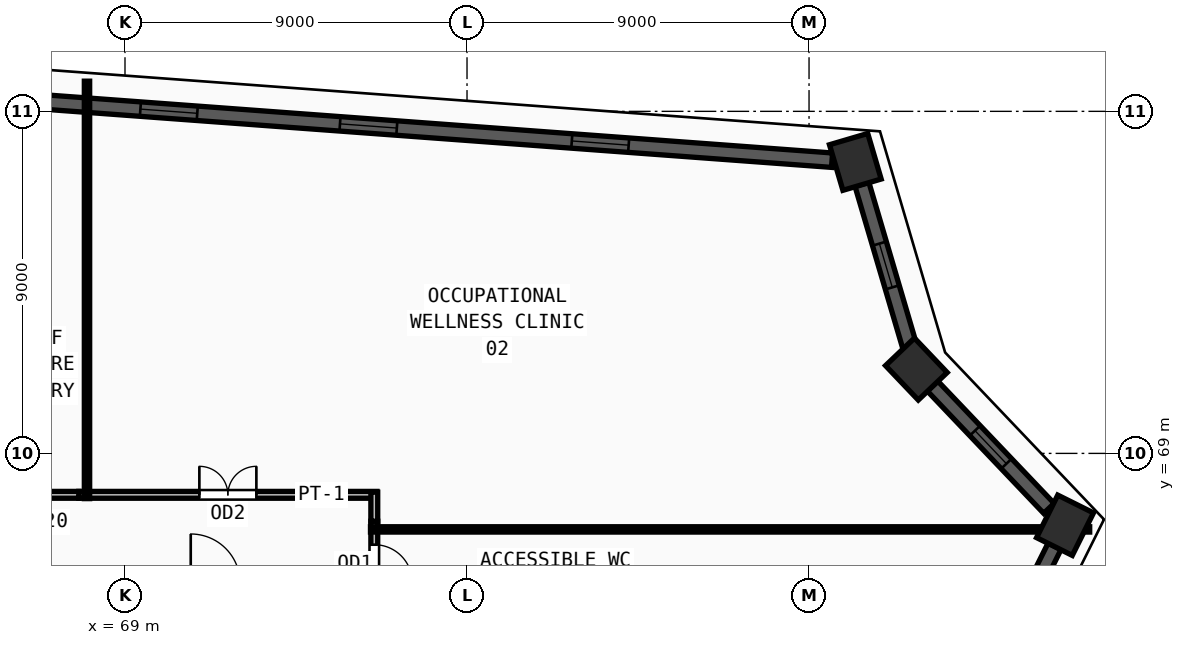
"""IFC4 building model, lengths in metres.
Left out: names, types, materials, properties, quantities, classifications, styles, units other than length and angle.
Written with IfcOpenShell. Run it as: python <this file> out.ifc"""

import sys

from ifc_helpers import new_model, si_unit, direction, frame, frame_2d, origin, origin_2d, place, context, subcontext, project, spatial, rectangle, extrude, source, transform, mapped, element, fill, save


model = new_model("IFC4")
c1 = context("Model", 3, precision=1e-05, world=origin(), true_north=direction((0.0, 1.0)))
c2 = subcontext(c1, "Body", "Model", "MODEL_VIEW")
j1 = project(units=[si_unit("LENGTHUNIT", "METRE"), si_unit("PLANEANGLEUNIT", "RADIAN")], contexts=[c1])
p1 = place(None, origin())
s1 = spatial("IfcSite", under=j1, at=p1, CompositionType="ELEMENT")
p2 = place(p1, origin())
s2 = spatial("IfcBuilding", under=s1, at=p2, CompositionType="ELEMENT")
p3 = place(p2, frame((0.0, 0.0, 201.75)))
s3 = spatial("IfcBuildingStorey", under=s2, at=p3, CompositionType="ELEMENT", Elevation=201.75)
m1 = source(origin(), c2, "Body", "SweptSolid", [
    extrude(rectangle(XDim=1.25, YDim=1.05, at=origin_2d()), origin(), (0.0, 0.0, 1.0), 3.75),
])
for number, where, z_axis, x_axis in (
    (1, (88.218, 76.67, 0.0), (0.0, 0.0, 1.0), (-0.283, 0.959, 0.0)),
    (2, (89.824, 71.219, 0.0), (0.0, 0.0, 1.0), (-0.689, 0.724, 0.0)),
    (3, (93.736, 67.109, 0.0), (0.0, 0.0, 1.0), (0.446, 0.895, 0.0)),
):
    element("IfcColumn", number, at=place(p3, frame(where, z_axis=z_axis, x_axis=x_axis)), inside=s3, PredefinedType="COLUMN", context=c2, shape_type="MappedRepresentation", body=[
        mapped(m1, transform((0.0, 0.0, 0.0), x_axis=(1.0, 0.0, 0.0), y_axis=(0.0, 1.0, 0.0), z_axis=(0.0, 0.0, 1.0), scale=1.0)),
    ])
p4 = place(p3, frame((80.249, 40.024, 0.0), z_axis=(0.0, 0.0, 1.0), x_axis=(0.445750225077, 0.895157381047, 0.0)))
e4 = element("IfcWall", 4, at=p4, inside=s3, PredefinedType="SOLIDWALL", context=c2, shape_type="SweptSolid", body=[
    extrude(rectangle(XDim=29.642, YDim=0.38, at=frame_2d((14.821, 0.0))), origin(), (0.0, 0.0, 1.0), 3.57),
])
m2 = source(origin(), c2, "Body", "SweptSolid", [
    extrude(rectangle(XDim=1.5, YDim=1.9, at=frame_2d((0.75, 0.95))), frame((0.0, 0.2, 0.0), z_axis=(0.0, -1.0, 0.0), x_axis=(1.0, 0.0, 0.0)), (0.0, 0.0, 1.0), 0.4),
])
p5 = place(p4, frame((7.51, 0.0, 0.55)))
e5 = element("IfcOpeningElement", 5, at=p5, cuts=e4, PredefinedType="OPENING", context=c2, shape_type="MappedRepresentation", body=[
    mapped(m2, transform((0.0, 0.0, 0.0), x_axis=(1.0, 0.0, 0.0), y_axis=(0.0, 1.0, 0.0), z_axis=(0.0, 0.0, 1.0), scale=1.0)),
])
p6 = place(p4, frame((14.071, 0.0, 0.55)))
e6 = element("IfcOpeningElement", 6, at=p6, cuts=e4, PredefinedType="OPENING", context=c2, shape_type="MappedRepresentation", body=[
    mapped(m2, transform((0.0, 0.0, 0.0), x_axis=(1.0, 0.0, 0.0), y_axis=(0.0, 1.0, 0.0), z_axis=(0.0, 0.0, 1.0), scale=1.0)),
])
p7 = place(p4, frame((21.481, 0.0, 0.55)))
e7 = element("IfcOpeningElement", 7, at=p7, cuts=e4, PredefinedType="OPENING", context=c2, shape_type="MappedRepresentation", body=[
    mapped(m2, transform((0.0, 0.0, 0.0), x_axis=(1.0, 0.0, 0.0), y_axis=(0.0, 1.0, 0.0), z_axis=(0.0, 0.0, 1.0), scale=1.0)),
])
p8 = place(p3, frame((93.312, 67.554, 0.0), z_axis=(0.0, 0.0, 1.0), x_axis=(-0.689339649611, 0.724438297906, 0.0)))
e8 = element("IfcWall", 8, at=p8, inside=s3, PredefinedType="SOLIDWALL", context=c2, shape_type="SweptSolid", body=[
    extrude(rectangle(XDim=4.445, YDim=0.38, at=frame_2d((2.222, 0.0))), origin(), (0.0, 0.0, 1.0), 3.57),
])
m3 = source(origin(), c2, "Body", "SweptSolid", [
    extrude(rectangle(XDim=1.2, YDim=1.9, at=frame_2d((0.6, 0.95))), frame((0.0, 0.2, 0.0), z_axis=(0.0, -1.0, 0.0), x_axis=(1.0, 0.0, 0.0)), (0.0, 0.0, 1.0), 0.4),
])
p9 = place(p8, frame((1.622, 0.0, 0.55)))
e9 = element("IfcOpeningElement", 9, at=p9, cuts=e8, PredefinedType="OPENING", context=c2, shape_type="MappedRepresentation", body=[
    mapped(m3, transform((0.0, 0.0, 0.0), x_axis=(1.0, 0.0, 0.0), y_axis=(0.0, 1.0, 0.0), z_axis=(0.0, 0.0, 1.0), scale=1.0)),
])
p10 = place(p3, frame((89.65, 71.809, 0.0), z_axis=(0.0, 0.0, 1.0), x_axis=(-0.282504740452, 0.95926590246, 0.0)))
e10 = element("IfcWall", 10, at=p10, inside=s3, PredefinedType="SOLIDWALL", context=c2, shape_type="SweptSolid", body=[
    extrude(rectangle(XDim=4.452, YDim=0.38, at=frame_2d((2.226, 0.0))), origin(), (0.0, 0.0, 1.0), 3.57),
])
p11 = place(p10, frame((1.626, 0.0, 0.55)))
e11 = element("IfcOpeningElement", 11, at=p11, cuts=e10, PredefinedType="OPENING", context=c2, shape_type="MappedRepresentation", body=[
    mapped(m3, transform((0.0, 0.0, 0.0), x_axis=(1.0, 0.0, 0.0), y_axis=(0.0, 1.0, 0.0), z_axis=(0.0, 0.0, 1.0), scale=1.0)),
])
p12 = place(p3, frame((87.605, 76.715, 0.0), z_axis=(0.0, 0.0, 1.0), x_axis=(-0.997283768188, 0.073655181142, 0.0)))
e12 = element("IfcWall", 12, at=p12, inside=s3, PredefinedType="SOLIDWALL", context=c2, shape_type="SweptSolid", body=[
    extrude(rectangle(XDim=24.465, YDim=0.38, at=frame_2d((12.233, 0.0))), origin(), (0.0, 0.0, 1.0), 3.57),
])
p13 = place(p12, frame((5.366, 0.0, 0.55)))
e13 = element("IfcOpeningElement", 13, at=p13, cuts=e12, PredefinedType="OPENING", context=c2, shape_type="MappedRepresentation", body=[
    mapped(m2, transform((0.0, 0.0, 0.0), x_axis=(1.0, 0.0, 0.0), y_axis=(0.0, 1.0, 0.0), z_axis=(0.0, 0.0, 1.0), scale=1.0)),
])
p14 = place(p12, frame((11.483, 0.0, 0.55)))
e14 = element("IfcOpeningElement", 14, at=p14, cuts=e12, PredefinedType="OPENING", context=c2, shape_type="MappedRepresentation", body=[
    mapped(m2, transform((0.0, 0.0, 0.0), x_axis=(1.0, 0.0, 0.0), y_axis=(0.0, 1.0, 0.0), z_axis=(0.0, 0.0, 1.0), scale=1.0)),
])
p15 = place(p12, frame((16.749, 0.0, 0.55)))
e15 = element("IfcOpeningElement", 15, at=p15, cuts=e12, PredefinedType="OPENING", context=c2, shape_type="MappedRepresentation", body=[
    mapped(m2, transform((0.0, 0.0, 0.0), x_axis=(1.0, 0.0, 0.0), y_axis=(0.0, 1.0, 0.0), z_axis=(0.0, 0.0, 1.0), scale=1.0)),
])
p16 = place(p3, frame((75.56, 67.215, 0.0), z_axis=(0.0, 0.0, 1.0), x_axis=(0.0, -1.0, 0.0)))
e16 = element("IfcWall", 16, at=p16, inside=s3, PredefinedType="PARTITIONING", context=c2, shape_type="SweptSolid", body=[
    extrude(rectangle(XDim=2.235, YDim=0.18, at=frame_2d((1.118, 0.0))), origin(), (0.0, 0.0, 1.0), 3.57),
])
m4 = source(origin(), c2, "Body", "SweptSolid", [
    extrude(rectangle(XDim=1.0, YDim=2.2, at=frame_2d((0.5, 1.1))), frame((0.0, 0.1, 0.0), z_axis=(0.0, -1.0, 0.0), x_axis=(1.0, 0.0, 0.0)), (0.0, 0.0, 1.0), 0.2),
])
p17 = place(p16, frame((0.617, 0.0, 0.0)))
e17 = element("IfcOpeningElement", 17, at=p17, cuts=e16, PredefinedType="OPENING", context=c2, shape_type="MappedRepresentation", body=[
    mapped(m4, transform((0.0, 0.0, 0.0), x_axis=(1.0, 0.0, 0.0), y_axis=(0.0, 1.0, 0.0), z_axis=(0.0, 0.0, 1.0), scale=1.0)),
])
p18 = place(p3, frame((67.785, 67.91, 0.0), z_axis=(0.0, 0.0, 1.0), x_axis=(1.0, 0.0, 0.0)))
e18 = element("IfcWall", 18, at=p18, inside=s3, PredefinedType="PARTITIONING", context=c2, shape_type="SweptSolid", body=[
    extrude(rectangle(XDim=7.845, YDim=0.18, at=frame_2d((3.922, 0.0))), origin(), (0.0, 0.0, 1.0), 3.57),
])
m5 = source(origin(), c2, "Body", "SweptSolid", [
    extrude(rectangle(XDim=1.5, YDim=2.2, at=frame_2d((0.75, 1.1))), frame((0.0, 0.1, 0.0), z_axis=(0.0, -1.0, 0.0), x_axis=(1.0, 0.0, 0.0)), (0.0, 0.0, 1.0), 0.2),
])
p19 = place(p18, frame((3.172, 0.0, 0.0)))
e19 = element("IfcOpeningElement", 19, at=p19, cuts=e18, PredefinedType="OPENING", context=c2, shape_type="MappedRepresentation", body=[
    mapped(m5, transform((0.0, 0.0, 0.0), x_axis=(1.0, 0.0, 0.0), y_axis=(0.0, 1.0, 0.0), z_axis=(0.0, 0.0, 1.0), scale=1.0)),
])
p20 = place(p3, frame((75.56, 67.98, 0.0), z_axis=(0.0, 0.0, 1.0), x_axis=(0.0, -1.0, 0.0)))
e20 = element("IfcWall", 20, at=p20, inside=s3, PredefinedType="PARTITIONING", context=c2, shape_type="SweptSolid", body=[
    extrude(rectangle(XDim=0.765, YDim=0.18, at=frame_2d((0.382, 0.0))), origin(), (0.0, 0.0, 1.0), 3.57),
])
p21 = place(p3, frame((65.39, 67.91, 0.0), z_axis=(0.0, 0.0, 1.0), x_axis=(1.0, 0.0, 0.0)))
e21 = element("IfcWall", 21, at=p21, inside=s3, PredefinedType="PARTITIONING", context=c2, shape_type="SweptSolid", body=[
    extrude(rectangle(XDim=2.395, YDim=0.18, at=frame_2d((1.198, 0.0))), origin(), (0.0, 0.0, 1.0), 3.57),
])
p22 = place(p3, frame((75.46, 67.0, 0.0), z_axis=(0.0, 0.0, 1.0), x_axis=(1.0, 0.0, 0.0)))
e22 = element("IfcWall", 22, at=p22, inside=s3, PredefinedType="PARTITIONING", context=c2, shape_type="SweptSolid", body=[
    extrude(rectangle(XDim=18.925, YDim=0.14, at=frame_2d((9.462, 0.0))), origin(), (0.0, 0.0, 1.0), 2.855),
])
p23 = place(p3, frame((68.0, 67.81, 0.0), z_axis=(0.0, 0.0, 1.0), x_axis=(0.0, 1.0, 0.0)))
e23 = element("IfcWall", 23, at=p23, inside=s3, PredefinedType="PARTITIONING", context=c2, shape_type="SweptSolid", body=[
    extrude(rectangle(XDim=10.984, YDim=0.14, at=frame_2d((5.492, 0.0))), origin(), (0.0, 0.0, 1.0), 3.57),
])
m6 = source(origin(), c2, "Body", "SweptSolid", [
    extrude(rectangle(XDim=1.2, YDim=1.9, at=frame_2d((0.6, 0.95))), frame((0.0, 0.03, 0.0), z_axis=(0.0, -1.0, 0.0), x_axis=(1.0, 0.0, 0.0)), (0.0, 0.0, 1.0), 0.06),
])
p24 = place(p9, origin())
e24 = element("IfcWindow", 24, at=p24, inside=s3, PartitioningType="SINGLE_PANEL", PredefinedType="WINDOW", context=c2, shape_type="MappedRepresentation", body=[
    mapped(m6, transform((0.0, 0.0, 0.0), x_axis=(1.0, 0.0, 0.0), y_axis=(0.0, 1.0, 0.0), z_axis=(0.0, 0.0, 1.0), scale=1.0)),
])
fill(e9, e24)
p25 = place(p11, origin())
e25 = element("IfcWindow", 25, at=p25, inside=s3, PartitioningType="SINGLE_PANEL", PredefinedType="WINDOW", context=c2, shape_type="MappedRepresentation", body=[
    mapped(m6, transform((0.0, 0.0, 0.0), x_axis=(1.0, 0.0, 0.0), y_axis=(0.0, 1.0, 0.0), z_axis=(0.0, 0.0, 1.0), scale=1.0)),
])
fill(e11, e25)
m7 = source(origin(), c2, "Body", "SweptSolid", [
    extrude(rectangle(XDim=1.5, YDim=1.9, at=frame_2d((0.75, 0.95))), frame((0.0, 0.03, 0.0), z_axis=(0.0, -1.0, 0.0), x_axis=(1.0, 0.0, 0.0)), (0.0, 0.0, 1.0), 0.06),
])
p26 = place(p13, origin())
e26 = element("IfcWindow", 26, at=p26, inside=s3, PartitioningType="DOUBLE_PANEL_VERTICAL", PredefinedType="WINDOW", context=c2, shape_type="MappedRepresentation", body=[
    mapped(m7, transform((0.0, 0.0, 0.0), x_axis=(1.0, 0.0, 0.0), y_axis=(0.0, 1.0, 0.0), z_axis=(0.0, 0.0, 1.0), scale=1.0)),
])
fill(e13, e26)
p27 = place(p14, origin())
e27 = element("IfcWindow", 27, at=p27, inside=s3, PartitioningType="DOUBLE_PANEL_VERTICAL", PredefinedType="WINDOW", context=c2, shape_type="MappedRepresentation", body=[
    mapped(m7, transform((0.0, 0.0, 0.0), x_axis=(1.0, 0.0, 0.0), y_axis=(0.0, 1.0, 0.0), z_axis=(0.0, 0.0, 1.0), scale=1.0)),
])
fill(e14, e27)
p28 = place(p15, origin())
e28 = element("IfcWindow", 28, at=p28, inside=s3, PartitioningType="DOUBLE_PANEL_VERTICAL", PredefinedType="WINDOW", context=c2, shape_type="MappedRepresentation", body=[
    mapped(m7, transform((0.0, 0.0, 0.0), x_axis=(1.0, 0.0, 0.0), y_axis=(0.0, 1.0, 0.0), z_axis=(0.0, 0.0, 1.0), scale=1.0)),
])
fill(e15, e28)
m8 = source(origin(), c2, "Body", "SweptSolid", [
    extrude(rectangle(XDim=1.0, YDim=2.2, at=frame_2d((0.5, 1.1))), frame((0.0, 0.025, 0.0), z_axis=(0.0, -1.0, 0.0), x_axis=(1.0, 0.0, 0.0)), (0.0, 0.0, 1.0), 0.05),
])
p29 = place(p17, origin())
e29 = element("IfcDoor", 29, at=p29, inside=s3, OperationType="SINGLE_SWING_RIGHT", PredefinedType="DOOR", context=c2, shape_type="MappedRepresentation", body=[
    mapped(m8, transform((0.0, 0.0, 0.0), x_axis=(1.0, 0.0, 0.0), y_axis=(0.0, 1.0, 0.0), z_axis=(0.0, 0.0, 1.0), scale=1.0)),
])
fill(e17, e29)
m9 = source(origin(), c2, "Body", "SweptSolid", [
    extrude(rectangle(XDim=1.5, YDim=2.2, at=frame_2d((0.75, 1.1))), frame((0.0, 0.025, 0.0), z_axis=(0.0, -1.0, 0.0), x_axis=(1.0, 0.0, 0.0)), (0.0, 0.0, 1.0), 0.05),
])
p30 = place(p19, origin())
e30 = element("IfcDoor", 30, at=p30, inside=s3, OperationType="DOUBLE_DOOR_SINGLE_SWING", PredefinedType="DOOR", context=c2, shape_type="MappedRepresentation", body=[
    mapped(m9, transform((0.0, 0.0, 0.0), x_axis=(1.0, 0.0, 0.0), y_axis=(0.0, 1.0, 0.0), z_axis=(0.0, 0.0, 1.0), scale=1.0)),
])
fill(e19, e30)
save(model, sys.argv[1])
